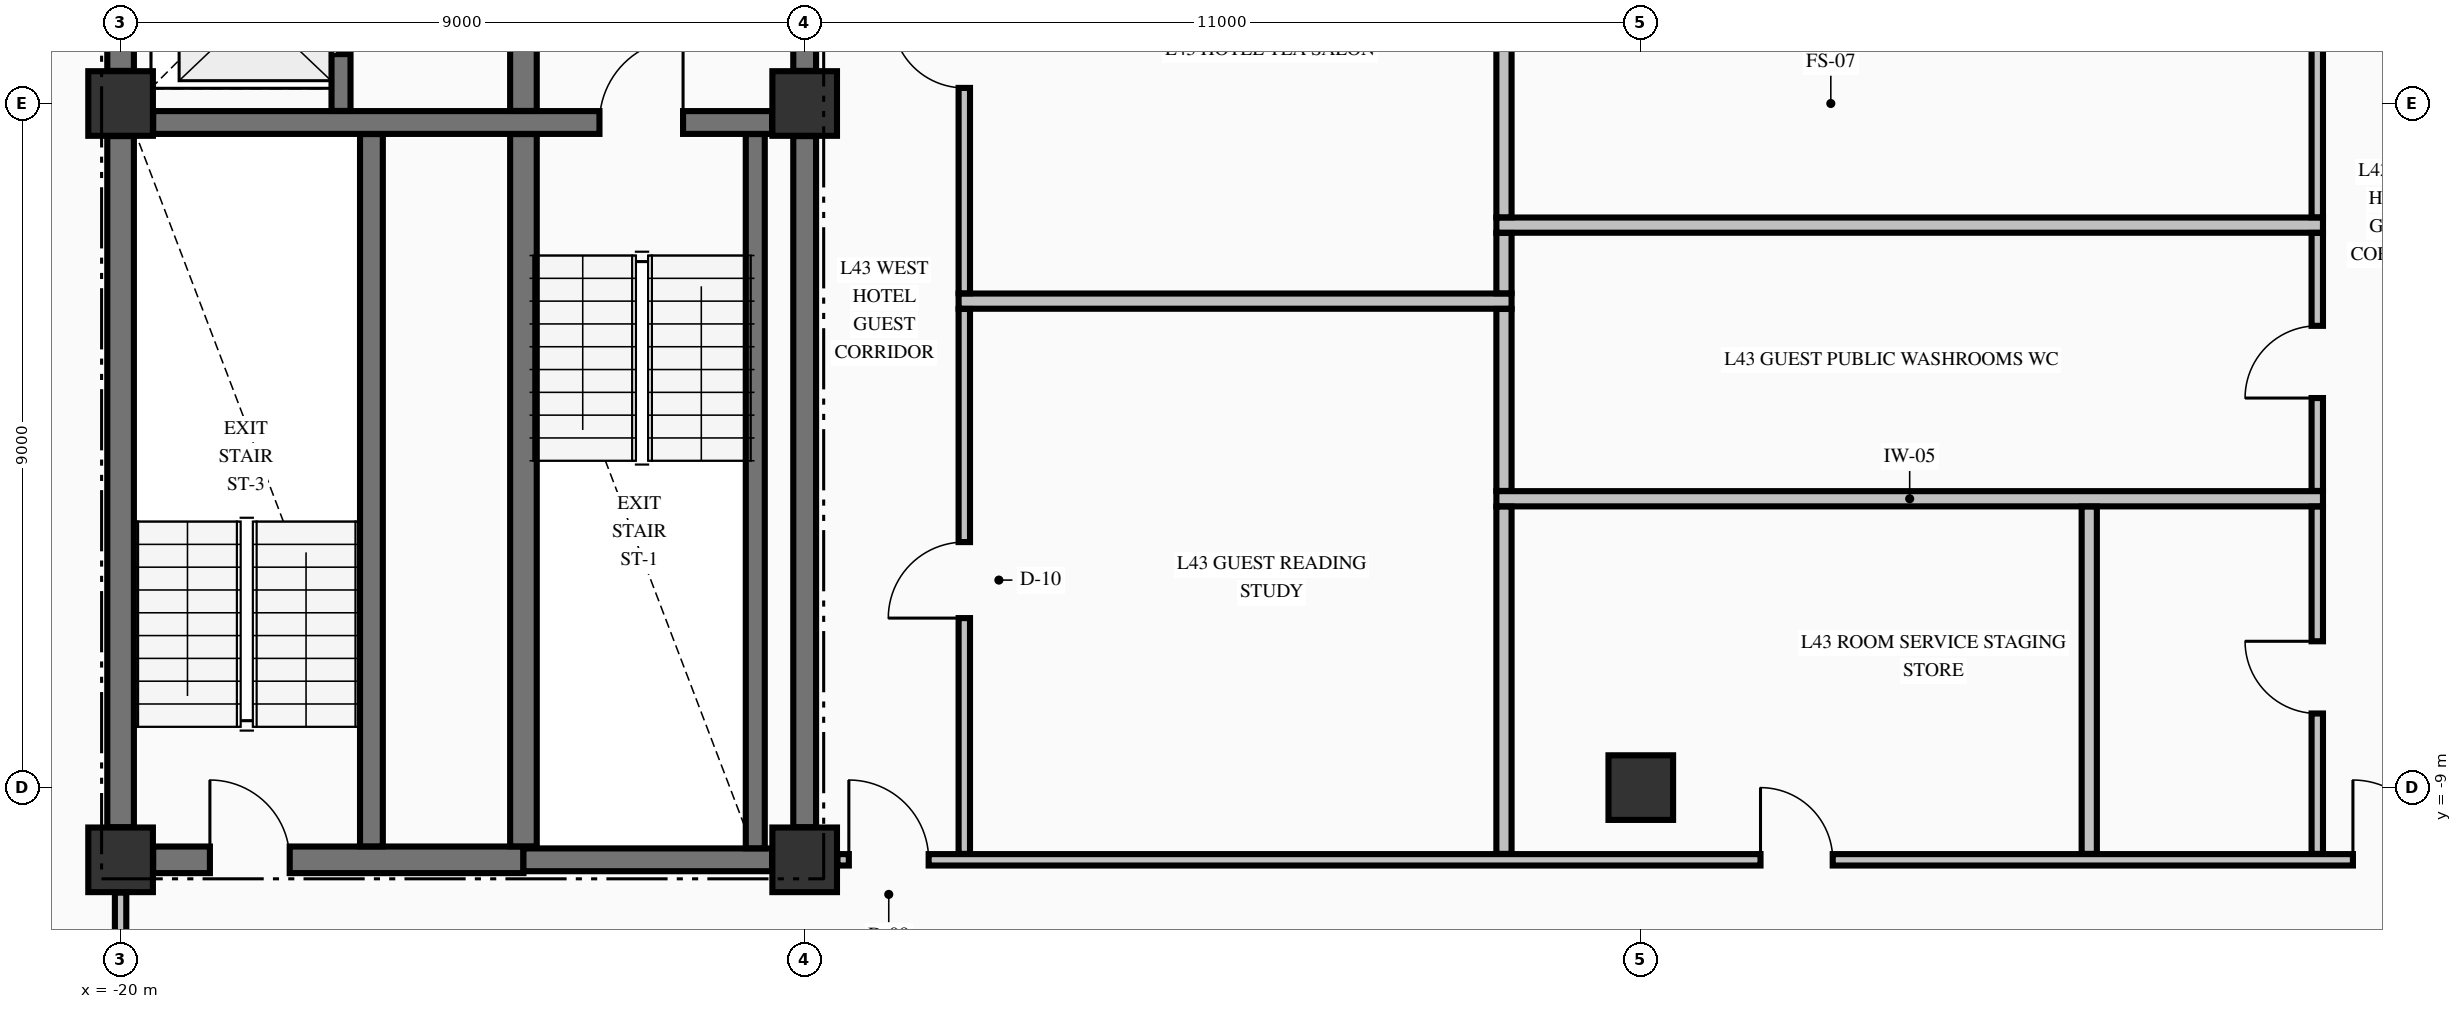
"""IFC4 building model, lengths in metres.
Left out: names, types, materials, properties, quantities, classifications, styles, units other than length and angle.
Written with IfcOpenShell. Run it as: python <this file> out.ifc"""

import sys

from ifc_helpers import new_model, si_unit, direction, frame, frame_2d, origin, origin_2d, place, context, subcontext, project, spatial, rectangle, extrude, element, fill, save


model = new_model("IFC4")
c1 = context("Model", 3, precision=1e-05, world=origin(), true_north=direction((0.0, 1.0)))
c2 = subcontext(c1, "Body", "Model", "MODEL_VIEW")
j1 = project(units=[si_unit("LENGTHUNIT", "METRE"), si_unit("PLANEANGLEUNIT", "RADIAN")], contexts=[c1])
p1 = place(None, origin())
s1 = spatial("IfcSite", under=j1, at=p1, CompositionType="ELEMENT")
p2 = place(p1, origin())
s2 = spatial("IfcBuilding", under=s1, at=p2, CompositionType="ELEMENT")
p3 = place(p2, frame((0.0, 0.0, 169.46)))
s3 = spatial("IfcBuildingStorey", under=s2, at=p3, CompositionType="ELEMENT", Elevation=169.46)
for number, where, z_axis, x_axis in (
    (1, (-20.0, -9.95, -0.25), (0.0, 0.0, 1.0), (1.0, 0.0, 0.0)),
    (2, (-11.0, -9.95, -0.25), (0.0, 0.0, 1.0), (1.0, 0.0, 0.0)),
    (3, (-11.0, 0.0, -0.25), (0.0, 0.0, 1.0), (1.0, 0.0, 0.0)),
    (4, (0.0, -9.0, -0.25), (0.0, 0.0, 1.0), (1.0, 0.0, 0.0)),
    (5, (-20.0, 0.0, -0.25), (0.0, 0.0, 1.0), (1.0, 0.0, 0.0)),
):
    element("IfcColumn", number, at=place(p3, frame(where, z_axis=z_axis, x_axis=x_axis)), inside=s3, PredefinedType="COLUMN", context=c2, shape_type="SweptSolid", body=[
        extrude(rectangle(XDim=0.85, YDim=0.85, at=origin_2d()), origin(), (0.0, 0.0, 1.0), 3.4),
    ])
p4 = place(p3, frame((-19.571, -9.95, 0.0), z_axis=(0.0, 0.0, 1.0), x_axis=(1.0, 0.0, 0.0)))
e6 = element("IfcWall", 6, at=p4, inside=s3, PredefinedType="SHEAR", context=c2, shape_type="SweptSolid", body=[
    extrude(rectangle(XDim=4.871, YDim=0.35, at=frame_2d((2.436, 0.0))), origin(), (0.0, 0.0, 1.0), 3.15),
])
p5 = place(p4, frame((0.746, 0.0, 0.0)))
e7 = element("IfcOpeningElement", 7, at=p5, cuts=e6, PredefinedType="OPENING", context=c2, shape_type="SweptSolid", body=[
    extrude(rectangle(XDim=1.05, YDim=2.15, at=frame_2d((0.525, 1.075))), frame((0.0, 0.185, 0.0), z_axis=(0.0, -1.0, 0.0), x_axis=(1.0, 0.0, 0.0)), (0.0, 0.0, 1.0), 0.37),
])
p6 = place(p3, frame((-14.7, -9.95, 0.0), z_axis=(0.0, 0.0, 1.0), x_axis=(1.0, 0.0, 0.0)))
e8 = element("IfcWall", 8, at=p6, inside=s3, PredefinedType="SHEAR", context=c2, shape_type="SweptSolid", body=[
    extrude(rectangle(XDim=3.271, YDim=0.3, at=frame_2d((1.635, 0.0))), origin(), (0.0, 0.0, 1.0), 3.15),
])
p7 = place(p3, frame((-19.571, -0.25, 0.0), z_axis=(0.0, 0.0, 1.0), x_axis=(1.0, 0.0, 0.0)))
e9 = element("IfcWall", 9, at=p7, inside=s3, PredefinedType="SHEAR", context=c2, shape_type="SweptSolid", body=[
    extrude(rectangle(XDim=8.142, YDim=0.3, at=frame_2d((4.071, 0.0))), origin(), (0.0, 0.0, 1.0), 3.15),
])
p8 = place(p7, frame((5.871, 0.0, 0.0)))
e10 = element("IfcOpeningElement", 10, at=p8, cuts=e9, PredefinedType="OPENING", context=c2, shape_type="SweptSolid", body=[
    extrude(rectangle(XDim=1.1, YDim=2.15, at=frame_2d((0.55, 1.075))), frame((0.0, 0.16, 0.0), z_axis=(0.0, -1.0, 0.0), x_axis=(1.0, 0.0, 0.0)), (0.0, 0.0, 1.0), 0.32),
])
p9 = place(p3, frame((-10.569, -9.95, 0.0), z_axis=(0.0, 0.0, 1.0), x_axis=(1.0, 0.0, 0.0)))
e11 = element("IfcWall", 11, at=p9, inside=s3, PredefinedType="PARTITIONING", context=c2, shape_type="SweptSolid", body=[
    extrude(rectangle(XDim=21.138, YDim=0.15, at=frame_2d((10.569, 0.0))), origin(), (0.0, 0.0, 1.0), 3.15),
])
p10 = place(p9, frame((0.15, 0.0, 0.0)))
e12 = element("IfcOpeningElement", 12, at=p10, cuts=e11, PredefinedType="OPENING", context=c2, shape_type="SweptSolid", body=[
    extrude(rectangle(XDim=1.05, YDim=2.15, at=frame_2d((0.525, 1.075))), frame((0.0, 0.085, 0.0), z_axis=(0.0, -1.0, 0.0), x_axis=(1.0, 0.0, 0.0)), (0.0, 0.0, 1.0), 0.17),
])
p11 = place(p9, frame((19.938, 0.0, 0.0)))
e13 = element("IfcOpeningElement", 13, at=p11, cuts=e11, PredefinedType="OPENING", context=c2, shape_type="SweptSolid", body=[
    extrude(rectangle(XDim=1.05, YDim=2.15, at=frame_2d((0.525, 1.075))), frame((0.0, 0.085, 0.0), z_axis=(0.0, -1.0, 0.0), x_axis=(1.0, 0.0, 0.0)), (0.0, 0.0, 1.0), 0.17),
])
p12 = place(p9, frame((12.144, 0.0, 0.0)))
e14 = element("IfcOpeningElement", 14, at=p12, cuts=e11, PredefinedType="OPENING", context=c2, shape_type="SweptSolid", body=[
    extrude(rectangle(XDim=0.95, YDim=2.15, at=frame_2d((0.475, 1.075))), frame((0.0, 0.085, 0.0), z_axis=(0.0, -1.0, 0.0), x_axis=(1.0, 0.0, 0.0)), (0.0, 0.0, 1.0), 0.17),
])
p13 = place(p3, frame((-1.9, -5.2, 0.0), z_axis=(0.0, 0.0, 1.0), x_axis=(1.0, 0.0, 0.0)))
e15 = element("IfcWall", 15, at=p13, inside=s3, PredefinedType="PARTITIONING", context=c2, shape_type="SweptSolid", body=[
    extrude(rectangle(XDim=10.875, YDim=0.2, at=frame_2d((5.438, 0.0))), origin(), (0.0, 0.0, 1.0), 3.15),
])
p14 = place(p3, frame((-8.975, -2.6, 0.0), z_axis=(0.0, 0.0, 1.0), x_axis=(1.0, 0.0, 0.0)))
e16 = element("IfcWall", 16, at=p14, inside=s3, PredefinedType="PARTITIONING", context=c2, shape_type="SweptSolid", body=[
    extrude(rectangle(XDim=7.275, YDim=0.2, at=frame_2d((3.638, 0.0))), origin(), (0.0, 0.0, 1.0), 3.15),
])
p15 = place(p3, frame((-1.9, -1.6, 0.0), z_axis=(0.0, 0.0, 1.0), x_axis=(1.0, 0.0, 0.0)))
e17 = element("IfcWall", 17, at=p15, inside=s3, PredefinedType="PARTITIONING", context=c2, shape_type="SweptSolid", body=[
    extrude(rectangle(XDim=10.875, YDim=0.2, at=frame_2d((5.438, 0.0))), origin(), (0.0, 0.0, 1.0), 3.15),
])
p16 = place(p3, frame((-20.0, -9.521, 0.0), z_axis=(0.0, 0.0, 1.0), x_axis=(0.0, 1.0, 0.0)))
e18 = element("IfcWall", 18, at=p16, inside=s3, PredefinedType="SHEAR", context=c2, shape_type="SweptSolid", body=[
    extrude(rectangle(XDim=9.092, YDim=0.35, at=frame_2d((4.546, 0.0))), origin(), (0.0, 0.0, 1.0), 3.15),
])
p17 = place(p3, frame((-20.0, 0.429, 0.0), z_axis=(0.0, 0.0, 1.0), x_axis=(0.0, 1.0, 0.0)))
e19 = element("IfcWall", 19, at=p17, inside=s3, PredefinedType="SHEAR", context=c2, shape_type="SweptSolid", body=[
    extrude(rectangle(XDim=2.094, YDim=0.35, at=frame_2d((1.047, 0.0))), origin(), (0.0, 0.0, 1.0), 3.15),
])
p18 = place(p3, frame((-17.1, -0.098, 0.0), z_axis=(0.0, 0.0, 1.0), x_axis=(0.0, 1.0, 0.0)))
e20 = element("IfcWall", 20, at=p18, inside=s3, PredefinedType="SOLIDWALL", context=c2, shape_type="SweptSolid", body=[
    extrude(rectangle(XDim=2.621, YDim=0.25, at=frame_2d((1.311, 0.0))), origin(), (0.0, 0.0, 1.0), 3.15),
])
p19 = place(p18, frame((0.748, 0.0, 0.0)))
e21 = element("IfcOpeningElement", 21, at=p19, cuts=e20, PredefinedType="OPENING", context=c2, shape_type="SweptSolid", body=[
    extrude(rectangle(XDim=1.1, YDim=2.2, at=frame_2d((0.55, 1.1))), frame((0.0, 0.135, 0.0), z_axis=(0.0, -1.0, 0.0), x_axis=(1.0, 0.0, 0.0)), (0.0, 0.0, 1.0), 0.27),
])
p20 = place(p3, frame((-16.7, -9.773, 0.0), z_axis=(0.0, 0.0, 1.0), x_axis=(0.0, 1.0, 0.0)))
e22 = element("IfcWall", 22, at=p20, inside=s3, PredefinedType="SHEAR", context=c2, shape_type="SweptSolid", body=[
    extrude(rectangle(XDim=9.371, YDim=0.3, at=frame_2d((4.686, 0.0))), origin(), (0.0, 0.0, 1.0), 3.15),
])
p21 = place(p3, frame((-14.7, -9.773, 0.0), z_axis=(0.0, 0.0, 1.0), x_axis=(0.0, 1.0, 0.0)))
e23 = element("IfcWall", 23, at=p21, inside=s3, PredefinedType="SHEAR", context=c2, shape_type="SweptSolid", body=[
    extrude(rectangle(XDim=9.371, YDim=0.35, at=frame_2d((4.686, 0.0))), origin(), (0.0, 0.0, 1.0), 3.15),
])
p22 = place(p3, frame((-14.7, -0.098, 0.0), z_axis=(0.0, 0.0, 1.0), x_axis=(0.0, 1.0, 0.0)))
e24 = element("IfcWall", 24, at=p22, inside=s3, PredefinedType="SHEAR", context=c2, shape_type="SweptSolid", body=[
    extrude(rectangle(XDim=2.846, YDim=0.35, at=frame_2d((1.423, 0.0))), origin(), (0.0, 0.0, 1.0), 3.15),
])
p23 = place(p3, frame((-11.65, -9.798, 0.0), z_axis=(0.0, 0.0, 1.0), x_axis=(0.0, 1.0, 0.0)))
e25 = element("IfcWall", 25, at=p23, inside=s3, PredefinedType="SOLIDWALL", context=c2, shape_type="SweptSolid", body=[
    extrude(rectangle(XDim=9.396, YDim=0.25, at=frame_2d((4.698, 0.0))), origin(), (0.0, 0.0, 1.0), 3.15),
])
p24 = place(p3, frame((-11.0, -9.521, 0.0), z_axis=(0.0, 0.0, 1.0), x_axis=(0.0, 1.0, 0.0)))
e26 = element("IfcWall", 26, at=p24, inside=s3, PredefinedType="SHEAR", context=c2, shape_type="SweptSolid", body=[
    extrude(rectangle(XDim=9.092, YDim=0.3, at=frame_2d((4.546, 0.0))), origin(), (0.0, 0.0, 1.0), 3.15),
])
p25 = place(p3, frame((-11.0, 0.429, 0.0), z_axis=(0.0, 0.0, 1.0), x_axis=(0.0, 1.0, 0.0)))
e27 = element("IfcWall", 27, at=p25, inside=s3, PredefinedType="SHEAR", context=c2, shape_type="SweptSolid", body=[
    extrude(rectangle(XDim=2.319, YDim=0.3, at=frame_2d((1.16, 0.0))), origin(), (0.0, 0.0, 1.0), 3.15),
])
p26 = place(p25, frame((0.671, 0.0, 0.0)))
e28 = element("IfcOpeningElement", 28, at=p26, cuts=e27, PredefinedType="OPENING", context=c2, shape_type="SweptSolid", body=[
    extrude(rectangle(XDim=1.1, YDim=2.15, at=frame_2d((0.55, 1.075))), frame((0.0, 0.16, 0.0), z_axis=(0.0, -1.0, 0.0), x_axis=(1.0, 0.0, 0.0)), (0.0, 0.0, 1.0), 0.32),
])
p27 = place(p3, frame((-20.0, -12.722, 0.0), z_axis=(0.0, 0.0, 1.0), x_axis=(0.0, 1.0, 0.0)))
e29 = element("IfcWall", 29, at=p27, inside=s3, PredefinedType="PARTITIONING", context=c2, shape_type="SweptSolid", body=[
    extrude(rectangle(XDim=2.341, YDim=0.15, at=frame_2d((1.17, 0.0))), origin(), (0.0, 0.0, 1.0), 2.342),
])
p28 = place(p3, frame((-8.9, -9.872, 0.0), z_axis=(0.0, 0.0, 1.0), x_axis=(0.0, 1.0, 0.0)))
e30 = element("IfcWall", 30, at=p28, inside=s3, PredefinedType="PARTITIONING", context=c2, shape_type="SweptSolid", body=[
    extrude(rectangle(XDim=7.169, YDim=0.15, at=frame_2d((3.584, 0.0))), origin(), (0.0, 0.0, 1.0), 3.15),
])
p29 = place(p28, frame((3.102, 0.0, 0.0)))
e31 = element("IfcOpeningElement", 31, at=p29, cuts=e30, PredefinedType="OPENING", context=c2, shape_type="SweptSolid", body=[
    extrude(rectangle(XDim=1.0, YDim=2.15, at=frame_2d((0.5, 1.075))), frame((0.0, 0.085, 0.0), z_axis=(0.0, -1.0, 0.0), x_axis=(1.0, 0.0, 0.0)), (0.0, 0.0, 1.0), 0.17),
])
p30 = place(p3, frame((-8.9, -2.497, 0.0), z_axis=(0.0, 0.0, 1.0), x_axis=(0.0, 1.0, 0.0)))
e32 = element("IfcWall", 32, at=p30, inside=s3, PredefinedType="PARTITIONING", context=c2, shape_type="SweptSolid", body=[
    extrude(rectangle(XDim=6.344, YDim=0.15, at=frame_2d((3.172, 0.0))), origin(), (0.0, 0.0, 1.0), 3.15),
])
p31 = place(p30, frame((2.702, 0.0, 0.0)))
e33 = element("IfcOpeningElement", 33, at=p31, cuts=e32, PredefinedType="OPENING", context=c2, shape_type="SweptSolid", body=[
    extrude(rectangle(XDim=0.95, YDim=2.15, at=frame_2d((0.475, 1.075))), frame((0.0, 0.085, 0.0), z_axis=(0.0, -1.0, 0.0), x_axis=(1.0, 0.0, 0.0)), (0.0, 0.0, 1.0), 0.17),
])
p32 = place(p3, frame((-1.8, -9.872, 0.0), z_axis=(0.0, 0.0, 1.0), x_axis=(0.0, 1.0, 0.0)))
e34 = element("IfcWall", 34, at=p32, inside=s3, PredefinedType="PARTITIONING", context=c2, shape_type="SweptSolid", body=[
    extrude(rectangle(XDim=4.569, YDim=0.2, at=frame_2d((2.285, 0.0))), origin(), (0.0, 0.0, 1.0), 3.15),
])
p33 = place(p3, frame((-1.8, -5.097, 0.0), z_axis=(0.0, 0.0, 1.0), x_axis=(0.0, 1.0, 0.0)))
e35 = element("IfcWall", 35, at=p33, inside=s3, PredefinedType="PARTITIONING", context=c2, shape_type="SweptSolid", body=[
    extrude(rectangle(XDim=2.394, YDim=0.2, at=frame_2d((1.197, 0.0))), origin(), (0.0, 0.0, 1.0), 3.15),
])
p34 = place(p3, frame((-1.8, -2.497, 0.0), z_axis=(0.0, 0.0, 1.0), x_axis=(0.0, 1.0, 0.0)))
e36 = element("IfcWall", 36, at=p34, inside=s3, PredefinedType="PARTITIONING", context=c2, shape_type="SweptSolid", body=[
    extrude(rectangle(XDim=0.794, YDim=0.2, at=frame_2d((0.397, 0.0))), origin(), (0.0, 0.0, 1.0), 3.15),
])
p35 = place(p3, frame((-1.8, -1.497, 0.0), z_axis=(0.0, 0.0, 1.0), x_axis=(0.0, 1.0, 0.0)))
e37 = element("IfcWall", 37, at=p35, inside=s3, PredefinedType="PARTITIONING", context=c2, shape_type="SweptSolid", body=[
    extrude(rectangle(XDim=5.344, YDim=0.2, at=frame_2d((2.672, 0.0))), origin(), (0.0, 0.0, 1.0), 3.15),
])
p36 = place(p3, frame((5.9, -9.872, 0.0), z_axis=(0.0, 0.0, 1.0), x_axis=(0.0, 1.0, 0.0)))
e38 = element("IfcWall", 38, at=p36, inside=s3, PredefinedType="PARTITIONING", context=c2, shape_type="SweptSolid", body=[
    extrude(rectangle(XDim=4.569, YDim=0.2, at=frame_2d((2.285, 0.0))), origin(), (0.0, 0.0, 1.0), 3.15),
])
p37 = place(p3, frame((8.9, -9.872, 0.0), z_axis=(0.0, 0.0, 1.0), x_axis=(0.0, 1.0, 0.0)))
e39 = element("IfcWall", 39, at=p37, inside=s3, PredefinedType="PARTITIONING", context=c2, shape_type="SweptSolid", body=[
    extrude(rectangle(XDim=4.569, YDim=0.15, at=frame_2d((2.285, 0.0))), origin(), (0.0, 0.0, 1.0), 3.15),
])
p38 = place(p37, frame((1.847, 0.0, 0.0)))
e40 = element("IfcOpeningElement", 40, at=p38, cuts=e39, PredefinedType="OPENING", context=c2, shape_type="SweptSolid", body=[
    extrude(rectangle(XDim=0.95, YDim=2.15, at=frame_2d((0.475, 1.075))), frame((0.0, 0.085, 0.0), z_axis=(0.0, -1.0, 0.0), x_axis=(1.0, 0.0, 0.0)), (0.0, 0.0, 1.0), 0.17),
])
p39 = place(p3, frame((8.9, -5.097, 0.0), z_axis=(0.0, 0.0, 1.0), x_axis=(0.0, 1.0, 0.0)))
e41 = element("IfcWall", 41, at=p39, inside=s3, PredefinedType="PARTITIONING", context=c2, shape_type="SweptSolid", body=[
    extrude(rectangle(XDim=3.394, YDim=0.15, at=frame_2d((1.697, 0.0))), origin(), (0.0, 0.0, 1.0), 3.15),
])
p40 = place(p39, frame((1.222, 0.0, 0.0)))
e42 = element("IfcOpeningElement", 42, at=p40, cuts=e41, PredefinedType="OPENING", context=c2, shape_type="SweptSolid", body=[
    extrude(rectangle(XDim=0.95, YDim=2.15, at=frame_2d((0.475, 1.075))), frame((0.0, 0.085, 0.0), z_axis=(0.0, -1.0, 0.0), x_axis=(1.0, 0.0, 0.0)), (0.0, 0.0, 1.0), 0.17),
])
p41 = place(p3, frame((8.9, -1.497, 0.0), z_axis=(0.0, 0.0, 1.0), x_axis=(0.0, 1.0, 0.0)))
e43 = element("IfcWall", 43, at=p41, inside=s3, PredefinedType="PARTITIONING", context=c2, shape_type="SweptSolid", body=[
    extrude(rectangle(XDim=11.919, YDim=0.15, at=frame_2d((5.959, 0.0))), origin(), (0.0, 0.0, 1.0), 3.15),
])
p42 = place(p41, frame((5.397, 0.0, 0.0)))
e44 = element("IfcOpeningElement", 44, at=p42, cuts=e43, PredefinedType="OPENING", context=c2, shape_type="SweptSolid", body=[
    extrude(rectangle(XDim=1.1, YDim=2.15, at=frame_2d((0.55, 1.075))), frame((0.0, 0.085, 0.0), z_axis=(0.0, -1.0, 0.0), x_axis=(1.0, 0.0, 0.0)), (0.0, 0.0, 1.0), 0.17),
])
p43 = place(p8, origin())
e45 = element("IfcDoor", 45, at=p43, inside=s3, OperationType="SINGLE_SWING_RIGHT", PredefinedType="DOOR", context=c2, shape_type="SweptSolid", body=[
    extrude(rectangle(XDim=1.1, YDim=2.15, at=frame_2d((0.55, 1.075))), frame((0.0, 0.025, 0.0), z_axis=(0.0, -1.0, 0.0), x_axis=(1.0, 0.0, 0.0)), (0.0, 0.0, 1.0), 0.05),
])
fill(e10, e45)
p44 = place(p5, origin())
e46 = element("IfcDoor", 46, at=p44, inside=s3, OperationType="SINGLE_SWING_LEFT", PredefinedType="DOOR", context=c2, shape_type="SweptSolid", body=[
    extrude(rectangle(XDim=1.05, YDim=2.15, at=frame_2d((0.525, 1.075))), frame((0.0, 0.025, 0.0), z_axis=(0.0, -1.0, 0.0), x_axis=(1.0, 0.0, 0.0)), (0.0, 0.0, 1.0), 0.05),
])
fill(e7, e46)
p45 = place(p19, origin())
e47 = element("IfcDoor", 47, at=p45, inside=s3, OperationType="SLIDING_TO_LEFT", PredefinedType="DOOR", context=c2, shape_type="SweptSolid", body=[
    extrude(rectangle(XDim=1.1, YDim=2.2, at=frame_2d((0.55, 1.1))), frame((0.0, 0.025, 0.0), z_axis=(0.0, -1.0, 0.0), x_axis=(1.0, 0.0, 0.0)), (0.0, 0.0, 1.0), 0.05),
])
fill(e21, e47)
p46 = place(p10, origin())
e48 = element("IfcDoor", 48, at=p46, inside=s3, OperationType="SINGLE_SWING_LEFT", PredefinedType="DOOR", context=c2, shape_type="SweptSolid", body=[
    extrude(rectangle(XDim=1.05, YDim=2.15, at=frame_2d((0.525, 1.075))), frame((0.0, 0.025, 0.0), z_axis=(0.0, -1.0, 0.0), x_axis=(1.0, 0.0, 0.0)), (0.0, 0.0, 1.0), 0.05),
])
fill(e12, e48)
p47 = place(p11, origin())
e49 = element("IfcDoor", 49, at=p47, inside=s3, OperationType="SINGLE_SWING_LEFT", PredefinedType="DOOR", context=c2, shape_type="SweptSolid", body=[
    extrude(rectangle(XDim=1.05, YDim=2.15, at=frame_2d((0.525, 1.075))), frame((0.0, 0.025, 0.0), z_axis=(0.0, -1.0, 0.0), x_axis=(1.0, 0.0, 0.0)), (0.0, 0.0, 1.0), 0.05),
])
fill(e13, e49)
p48 = place(p31, origin())
e50 = element("IfcDoor", 50, at=p48, inside=s3, OperationType="SINGLE_SWING_RIGHT", PredefinedType="DOOR", context=c2, shape_type="SweptSolid", body=[
    extrude(rectangle(XDim=0.95, YDim=2.15, at=frame_2d((0.475, 1.075))), frame((0.0, 0.025, 0.0), z_axis=(0.0, -1.0, 0.0), x_axis=(1.0, 0.0, 0.0)), (0.0, 0.0, 1.0), 0.05),
])
fill(e33, e50)
p49 = place(p29, origin())
e51 = element("IfcDoor", 51, at=p49, inside=s3, OperationType="SINGLE_SWING_LEFT", PredefinedType="DOOR", context=c2, shape_type="SweptSolid", body=[
    extrude(rectangle(XDim=1.0, YDim=2.15, at=frame_2d((0.5, 1.075))), frame((0.0, 0.025, 0.0), z_axis=(0.0, -1.0, 0.0), x_axis=(1.0, 0.0, 0.0)), (0.0, 0.0, 1.0), 0.05),
])
fill(e31, e51)
p50 = place(p40, origin())
e52 = element("IfcDoor", 52, at=p50, inside=s3, OperationType="SINGLE_SWING_LEFT", PredefinedType="DOOR", context=c2, shape_type="SweptSolid", body=[
    extrude(rectangle(XDim=0.95, YDim=2.15, at=frame_2d((0.475, 1.075))), frame((0.0, 0.025, 0.0), z_axis=(0.0, -1.0, 0.0), x_axis=(1.0, 0.0, 0.0)), (0.0, 0.0, 1.0), 0.05),
])
fill(e42, e52)
p51 = place(p38, origin())
e53 = element("IfcDoor", 53, at=p51, inside=s3, OperationType="SINGLE_SWING_RIGHT", PredefinedType="DOOR", context=c2, shape_type="SweptSolid", body=[
    extrude(rectangle(XDim=0.95, YDim=2.15, at=frame_2d((0.475, 1.075))), frame((0.0, 0.025, 0.0), z_axis=(0.0, -1.0, 0.0), x_axis=(1.0, 0.0, 0.0)), (0.0, 0.0, 1.0), 0.05),
])
fill(e40, e53)
p52 = place(p12, origin())
e54 = element("IfcDoor", 54, at=p52, inside=s3, OperationType="SINGLE_SWING_LEFT", PredefinedType="DOOR", context=c2, shape_type="SweptSolid", body=[
    extrude(rectangle(XDim=0.95, YDim=2.15, at=frame_2d((0.475, 1.075))), frame((0.0, 0.025, 0.0), z_axis=(0.0, -1.0, 0.0), x_axis=(1.0, 0.0, 0.0)), (0.0, 0.0, 1.0), 0.05),
])
fill(e14, e54)
save(model, sys.argv[1])
